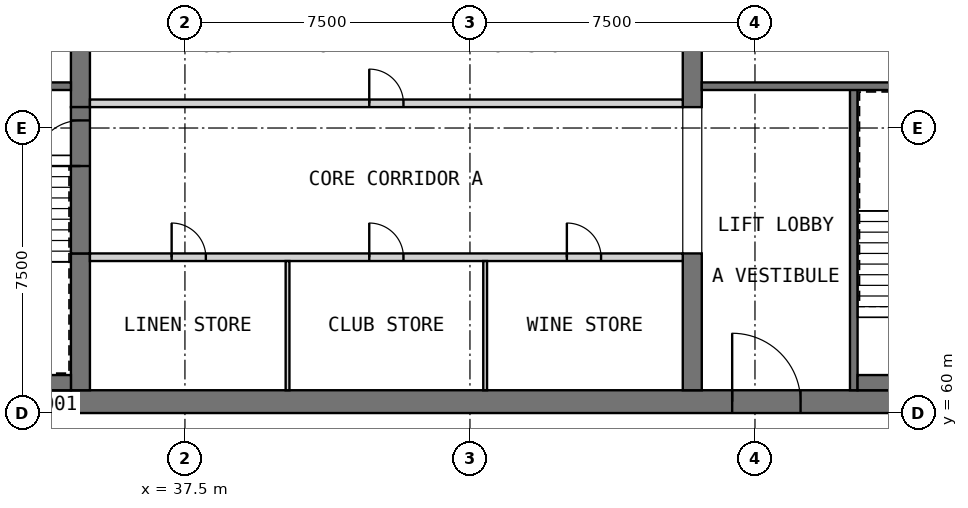
"""IFC4 building model, lengths in metres.
Left out: names, types, materials, properties, quantities, classifications, styles, units other than length and angle.
Written with IfcOpenShell. Run it as: python <this file> out.ifc"""

import sys

from ifc_helpers import new_model, si_unit, direction, frame, frame_2d, origin, place, context, subcontext, project, spatial, rectangle, extrude, element, fill, save


model = new_model("IFC4")
c1 = context("Model", 3, precision=1e-05, world=origin(), true_north=direction((0.0, 1.0)))
c2 = subcontext(c1, "Body", "Model", "MODEL_VIEW")
j1 = project(units=[si_unit("LENGTHUNIT", "METRE"), si_unit("PLANEANGLEUNIT", "RADIAN")], contexts=[c1])
p1 = place(None, origin())
s1 = spatial("IfcSite", under=j1, at=p1, CompositionType="ELEMENT")
p2 = place(p1, origin())
s2 = spatial("IfcBuilding", under=s1, at=p2, CompositionType="ELEMENT")
p3 = place(p2, frame((0.0, 0.0, 269.7)))
s3 = spatial("IfcBuildingStorey", under=s2, at=p3, CompositionType="ELEMENT", Elevation=269.7)
p4 = place(p3, frame((30.0, 60.3, 0.0), z_axis=(0.0, 0.0, 1.0), x_axis=(1.0, 0.0, 0.0)))
e1 = element("IfcWall", 1, at=p4, inside=s3, PredefinedType="SHEAR", context=c2, shape_type="SweptSolid", body=[
    extrude(rectangle(XDim=30.0, YDim=0.6, at=frame_2d((15.0, 0.0))), origin(), (0.0, 0.0, 1.0), 3.5),
])
p5 = place(p4, frame((21.9, 0.0, 0.0)))
e2 = element("IfcOpeningElement", 2, at=p5, cuts=e1, PredefinedType="OPENING", context=c2, shape_type="SweptSolid", body=[
    extrude(rectangle(XDim=1.8, YDim=2.1, at=frame_2d((0.9, 1.05))), frame((0.0, 0.31, 0.0), z_axis=(0.0, -1.0, 0.0), x_axis=(1.0, 0.0, 0.0)), (0.0, 0.0, 1.0), 0.62),
])
p6 = place(p4, frame((26.5, 0.0, 0.0)))
e3 = element("IfcOpeningElement", 3, at=p6, cuts=e1, PredefinedType="OPENING", context=c2, shape_type="SweptSolid", body=[
    extrude(rectangle(XDim=1.2, YDim=2.1, at=frame_2d((0.6, 1.05))), frame((0.0, 0.31, 0.0), z_axis=(0.0, -1.0, 0.0), x_axis=(1.0, 0.0, 0.0)), (0.0, 0.0, 1.0), 0.62),
])
p7 = place(p3, frame((34.75, 60.6, 0.0), z_axis=(0.0, 0.0, 1.0), x_axis=(0.0, 1.0, 0.0)))
e4 = element("IfcWall", 4, at=p7, inside=s3, PredefinedType="SHEAR", context=c2, shape_type="SweptSolid", body=[
    extrude(rectangle(XDim=3.6, YDim=0.5, at=frame_2d((1.8, 0.0))), origin(), (0.0, 0.0, 1.0), 3.5),
])
p8 = place(p3, frame((34.75, 68.05, 0.0), z_axis=(0.0, 0.0, 1.0), x_axis=(0.0, 1.0, 0.0)))
e5 = element("IfcWall", 5, at=p8, inside=s3, PredefinedType="SHEAR", context=c2, shape_type="SweptSolid", body=[
    extrude(rectangle(XDim=6.4, YDim=0.5, at=frame_2d((3.2, 0.0))), origin(), (0.0, 0.0, 1.0), 3.5),
])
p9 = place(p3, frame((50.85, 60.6, 0.0), z_axis=(0.0, 0.0, 1.0), x_axis=(0.0, 1.0, 0.0)))
e6 = element("IfcWall", 6, at=p9, inside=s3, PredefinedType="SHEAR", context=c2, shape_type="SweptSolid", body=[
    extrude(rectangle(XDim=3.6, YDim=0.5, at=frame_2d((1.8, 0.0))), origin(), (0.0, 0.0, 1.0), 3.5),
])
p10 = place(p3, frame((50.85, 68.05, 0.0), z_axis=(0.0, 0.0, 1.0), x_axis=(0.0, 1.0, 0.0)))
e7 = element("IfcWall", 7, at=p10, inside=s3, PredefinedType="SHEAR", context=c2, shape_type="SweptSolid", body=[
    extrude(rectangle(XDim=6.4, YDim=0.5, at=frame_2d((3.2, 0.0))), origin(), (0.0, 0.0, 1.0), 3.5),
])
p11 = place(p3, frame((35.0, 64.1, 0.0), z_axis=(0.0, 0.0, 1.0), x_axis=(1.0, 0.0, 0.0)))
e8 = element("IfcWall", 8, at=p11, inside=s3, PredefinedType="PARTITIONING", context=c2, shape_type="SweptSolid", body=[
    extrude(rectangle(XDim=15.6, YDim=0.2, at=frame_2d((7.8, 0.0))), origin(), (0.0, 0.0, 1.0), 3.25),
])
p12 = place(p11, frame((2.15, 0.0, 0.0)))
e9 = element("IfcOpeningElement", 9, at=p12, cuts=e8, PredefinedType="OPENING", context=c2, shape_type="SweptSolid", body=[
    extrude(rectangle(XDim=0.9, YDim=2.1, at=frame_2d((0.45, 1.05))), frame((0.0, 0.11, 0.0), z_axis=(0.0, -1.0, 0.0), x_axis=(1.0, 0.0, 0.0)), (0.0, 0.0, 1.0), 0.22),
])
p13 = place(p11, frame((7.35, 0.0, 0.0)))
e10 = element("IfcOpeningElement", 10, at=p13, cuts=e8, PredefinedType="OPENING", context=c2, shape_type="SweptSolid", body=[
    extrude(rectangle(XDim=0.9, YDim=2.1, at=frame_2d((0.45, 1.05))), frame((0.0, 0.11, 0.0), z_axis=(0.0, -1.0, 0.0), x_axis=(1.0, 0.0, 0.0)), (0.0, 0.0, 1.0), 0.22),
])
p14 = place(p11, frame((12.55, 0.0, 0.0)))
e11 = element("IfcOpeningElement", 11, at=p14, cuts=e8, PredefinedType="OPENING", context=c2, shape_type="SweptSolid", body=[
    extrude(rectangle(XDim=0.9, YDim=2.1, at=frame_2d((0.45, 1.05))), frame((0.0, 0.11, 0.0), z_axis=(0.0, -1.0, 0.0), x_axis=(1.0, 0.0, 0.0)), (0.0, 0.0, 1.0), 0.22),
])
for number, where, z_axis, x_axis in (
    (12, (40.2, 60.6, 0.0), (0.0, 0.0, 1.0), (0.0, 1.0, 0.0)),
    (13, (45.4, 60.6, 0.0), (0.0, 0.0, 1.0), (0.0, 1.0, 0.0)),
):
    element("IfcWall", number, at=place(p3, frame(where, z_axis=z_axis, x_axis=x_axis)), inside=s3, PredefinedType="PARTITIONING", context=c2, shape_type="SweptSolid", body=[
        extrude(rectangle(XDim=3.4, YDim=0.1, at=frame_2d((1.7, 0.0))), origin(), (0.0, 0.0, 1.0), 3.25),
    ])
p15 = place(p3, frame((35.0, 68.15, 0.0), z_axis=(0.0, 0.0, 1.0), x_axis=(1.0, 0.0, 0.0)))
e14 = element("IfcWall", 14, at=p15, inside=s3, PredefinedType="PARTITIONING", context=c2, shape_type="SweptSolid", body=[
    extrude(rectangle(XDim=15.6, YDim=0.2, at=frame_2d((7.8, 0.0))), origin(), (0.0, 0.0, 1.0), 3.25),
])
p16 = place(p15, frame((7.35, 0.0, 0.0)))
e15 = element("IfcOpeningElement", 15, at=p16, cuts=e14, PredefinedType="OPENING", context=c2, shape_type="SweptSolid", body=[
    extrude(rectangle(XDim=0.9, YDim=2.1, at=frame_2d((0.45, 1.05))), frame((0.0, 0.11, 0.0), z_axis=(0.0, -1.0, 0.0), x_axis=(1.0, 0.0, 0.0)), (0.0, 0.0, 1.0), 0.22),
])
p17 = place(p3, frame((34.75, 64.2, 0.0), z_axis=(0.0, 0.0, 1.0), x_axis=(0.0, 1.0, 0.0)))
e16 = element("IfcWall", 16, at=p17, inside=s3, PredefinedType="SOLIDWALL", context=c2, shape_type="SweptSolid", body=[
    extrude(rectangle(XDim=3.85, YDim=0.5, at=frame_2d((1.925, 0.0))), origin(), (0.0, 0.0, 1.0), 2.3),
])
p18 = place(p17, frame((2.3, 0.0, 0.0)))
e17 = element("IfcOpeningElement", 17, at=p18, cuts=e16, PredefinedType="OPENING", context=c2, shape_type="SweptSolid", body=[
    extrude(rectangle(XDim=1.2, YDim=2.1, at=frame_2d((0.6, 1.05))), frame((0.0, 0.26, 0.0), z_axis=(0.0, -1.0, 0.0), x_axis=(1.0, 0.0, 0.0)), (0.0, 0.0, 1.0), 0.52),
])
p19 = place(p3, frame((30.6, 68.6, 0.0), z_axis=(0.0, 0.0, 1.0), x_axis=(1.0, 0.0, 0.0)))
e18 = element("IfcWall", 18, at=p19, inside=s3, PredefinedType="SOLIDWALL", context=c2, shape_type="SweptSolid", body=[
    extrude(rectangle(XDim=3.9, YDim=0.2, at=frame_2d((1.95, 0.0))), origin(), (0.0, 0.0, 1.0), 3.25),
])
p20 = place(p19, frame((1.7, 0.0, 0.0)))
e19 = element("IfcOpeningElement", 19, at=p20, cuts=e18, PredefinedType="OPENING", context=c2, shape_type="SweptSolid", body=[
    extrude(rectangle(XDim=0.9, YDim=2.1, at=frame_2d((0.45, 1.05))), frame((0.0, 0.11, 0.0), z_axis=(0.0, -1.0, 0.0), x_axis=(1.0, 0.0, 0.0)), (0.0, 0.0, 1.0), 0.22),
])
p21 = place(p3, frame((55.1, 60.6, 0.0), z_axis=(0.0, 0.0, 1.0), x_axis=(0.0, 1.0, 0.0)))
e20 = element("IfcWall", 20, at=p21, inside=s3, PredefinedType="SOLIDWALL", context=c2, shape_type="SweptSolid", body=[
    extrude(rectangle(XDim=8.0, YDim=0.2, at=frame_2d((4.0, 0.0))), origin(), (0.0, 0.0, 1.0), 3.25),
])
p22 = place(p3, frame((51.1, 68.6, 0.0), z_axis=(0.0, 0.0, 1.0), x_axis=(1.0, 0.0, 0.0)))
e21 = element("IfcWall", 21, at=p22, inside=s3, PredefinedType="SOLIDWALL", context=c2, shape_type="SweptSolid", body=[
    extrude(rectangle(XDim=8.3, YDim=0.2, at=frame_2d((4.15, 0.0))), origin(), (0.0, 0.0, 1.0), 3.25),
])
p23 = place(p3, frame((31.0, 60.8, 0.0), z_axis=(0.0, 0.0, 1.0), x_axis=(1.0, 0.0, 0.0)))
e22 = element("IfcWall", 22, at=p23, inside=s3, PredefinedType="SOLIDWALL", context=c2, shape_type="SweptSolid", body=[
    extrude(rectangle(XDim=3.5, YDim=0.4, at=frame_2d((1.75, 0.0))), origin(), (0.0, 0.0, 1.0), 3.25),
])
p24 = place(p3, frame((55.2, 60.8, 0.0), z_axis=(0.0, 0.0, 1.0), x_axis=(1.0, 0.0, 0.0)))
e23 = element("IfcWall", 23, at=p24, inside=s3, PredefinedType="SOLIDWALL", context=c2, shape_type="SweptSolid", body=[
    extrude(rectangle(XDim=1.3, YDim=0.4, at=frame_2d((0.65, 0.0))), origin(), (0.0, 0.0, 1.0), 3.25),
])
p25 = place(p12, origin())
e24 = element("IfcDoor", 24, at=p25, inside=s3, OperationType="SINGLE_SWING_LEFT", PredefinedType="DOOR", context=c2, shape_type="SweptSolid", body=[
    extrude(rectangle(XDim=0.9, YDim=2.1, at=frame_2d((0.45, 1.05))), frame((0.0, 0.025, 0.0), z_axis=(0.0, -1.0, 0.0), x_axis=(1.0, 0.0, 0.0)), (0.0, 0.0, 1.0), 0.05),
])
fill(e9, e24)
p26 = place(p13, origin())
e25 = element("IfcDoor", 25, at=p26, inside=s3, OperationType="SINGLE_SWING_RIGHT", PredefinedType="DOOR", context=c2, shape_type="SweptSolid", body=[
    extrude(rectangle(XDim=0.9, YDim=2.1, at=frame_2d((0.45, 1.05))), frame((0.0, 0.025, 0.0), z_axis=(0.0, -1.0, 0.0), x_axis=(1.0, 0.0, 0.0)), (0.0, 0.0, 1.0), 0.05),
])
fill(e10, e25)
p27 = place(p14, origin())
e26 = element("IfcDoor", 26, at=p27, inside=s3, OperationType="SINGLE_SWING_LEFT", PredefinedType="DOOR", context=c2, shape_type="SweptSolid", body=[
    extrude(rectangle(XDim=0.9, YDim=2.1, at=frame_2d((0.45, 1.05))), frame((0.0, 0.025, 0.0), z_axis=(0.0, -1.0, 0.0), x_axis=(1.0, 0.0, 0.0)), (0.0, 0.0, 1.0), 0.05),
])
fill(e11, e26)
p28 = place(p16, origin())
e27 = element("IfcDoor", 27, at=p28, inside=s3, OperationType="SINGLE_SWING_LEFT", PredefinedType="DOOR", context=c2, shape_type="SweptSolid", body=[
    extrude(rectangle(XDim=0.9, YDim=2.1, at=frame_2d((0.45, 1.05))), frame((0.0, 0.025, 0.0), z_axis=(0.0, -1.0, 0.0), x_axis=(1.0, 0.0, 0.0)), (0.0, 0.0, 1.0), 0.05),
])
fill(e15, e27)
p29 = place(p5, origin())
e28 = element("IfcDoor", 28, at=p29, inside=s3, OperationType="DOUBLE_DOOR_SINGLE_SWING", PredefinedType="DOOR", context=c2, shape_type="SweptSolid", body=[
    extrude(rectangle(XDim=1.8, YDim=2.1, at=frame_2d((0.9, 1.05))), frame((0.0, 0.025, 0.0), z_axis=(0.0, -1.0, 0.0), x_axis=(1.0, 0.0, 0.0)), (0.0, 0.0, 1.0), 0.05),
])
fill(e2, e28)
p30 = place(p18, origin())
e29 = element("IfcDoor", 29, at=p30, inside=s3, OperationType="SINGLE_SWING_LEFT", PredefinedType="DOOR", context=c2, shape_type="SweptSolid", body=[
    extrude(rectangle(XDim=1.2, YDim=2.1, at=frame_2d((0.6, 1.05))), frame((0.0, 0.025, 0.0), z_axis=(0.0, -1.0, 0.0), x_axis=(1.0, 0.0, 0.0)), (0.0, 0.0, 1.0), 0.05),
])
fill(e17, e29)
save(model, sys.argv[1])
